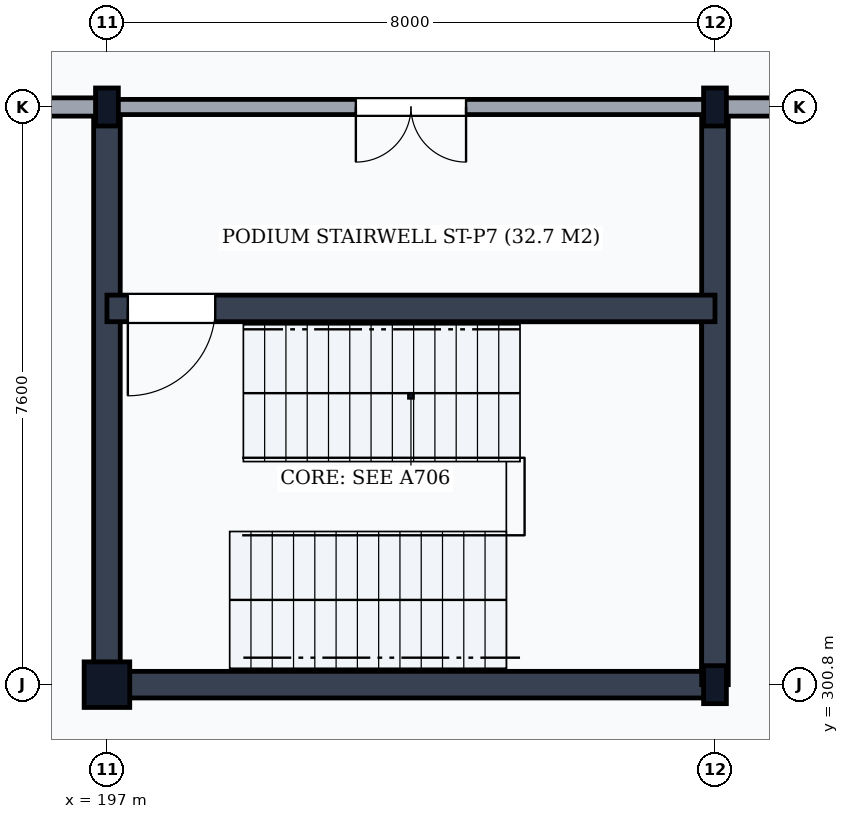
"""IFC4 building model, lengths in metres.
Left out: names, types, materials, properties, quantities, classifications, styles, units other than length and angle.
Written with IfcOpenShell. Run it as: python <this file> out.ifc"""

import sys

from ifc_helpers import new_model, si_unit, direction, frame, frame_2d, origin, origin_2d, place, context, subcontext, project, spatial, rectangle, i_section, extrude, element, fill, save


model = new_model("IFC4")
c1 = context("Model", 3, precision=1e-05, world=origin(), true_north=direction((0.0, 1.0)))
c2 = subcontext(c1, "Body", "Model", "MODEL_VIEW")
j1 = project(units=[si_unit("LENGTHUNIT", "METRE"), si_unit("PLANEANGLEUNIT", "RADIAN")], contexts=[c1])
p1 = place(None, origin())
s1 = spatial("IfcSite", under=j1, at=p1, CompositionType="ELEMENT")
p2 = place(p1, origin())
s2 = spatial("IfcBuilding", under=s1, at=p2, CompositionType="ELEMENT")
p3 = place(p2, frame((0.0, 0.0, -4.8)))
s3 = spatial("IfcBuildingStorey", under=s2, at=p3, CompositionType="ELEMENT", Elevation=-4.8)
p4 = place(p3, frame((197.0, 300.8, 0.0), z_axis=(0.0, 0.0, 1.0), x_axis=(1.0, 0.0, 0.0)))
e1 = element("IfcColumn", 1, at=p4, inside=s3, PredefinedType="COLUMN", context=c2, shape_type="SweptSolid", body=[
    extrude(rectangle(XDim=0.6, YDim=0.6, at=origin_2d()), origin(), (0.0, 0.0, 1.0), 4.8),
])
for number, where, z_axis, x_axis in (
    (2, (197.0, 308.4, 0.0), (0.0, 0.0, 1.0), (1.0, 0.0, 0.0)),
    (3, (205.0, 300.8, 0.0), (0.0, 0.0, 1.0), (1.0, 0.0, 0.0)),
    (4, (205.0, 308.4, 0.0), (0.0, 0.0, 1.0), (1.0, 0.0, 0.0)),
):
    element("IfcColumn", number, at=place(p3, frame(where, z_axis=z_axis, x_axis=x_axis)), inside=s3, PredefinedType="COLUMN", context=c2, shape_type="SweptSolid", body=[
        extrude(i_section(OverallWidth=0.3, OverallDepth=0.5, WebThickness=0.014, FlangeThickness=0.028, FilletRadius=0.027, at=origin_2d()), origin(), (0.0, 0.0, 1.0), 4.8),
    ])
p5 = place(p3, frame((197.0, 300.8, 0.0), z_axis=(0.0, 0.0, 1.0), x_axis=(1.0, 0.0, 0.0)))
e5 = element("IfcWall", 5, at=p5, inside=s3, PredefinedType="SHEAR", context=c2, shape_type="SweptSolid", body=[
    extrude(rectangle(XDim=8.0, YDim=0.35, at=frame_2d((4.0, 0.0))), origin(), (0.0, 0.0, 1.0), 4.51),
])
for number, where, z_axis, x_axis in (
    (6, (197.0, 300.8, 0.0), (0.0, 0.0, 1.0), (0.0, 1.0, 0.0)),
    (7, (205.0, 300.8, 0.0), (0.0, 0.0, 1.0), (0.0, 1.0, 0.0)),
):
    element("IfcWall", number, at=place(p3, frame(where, z_axis=z_axis, x_axis=x_axis)), inside=s3, PredefinedType="SHEAR", context=c2, shape_type="SweptSolid", body=[
        extrude(rectangle(XDim=7.6, YDim=0.35, at=frame_2d((3.8, 0.0))), origin(), (0.0, 0.0, 1.0), 4.51),
    ])
p6 = place(p3, frame((197.0, 305.75, 0.0), z_axis=(0.0, 0.0, 1.0), x_axis=(1.0, 0.0, 0.0)))
e8 = element("IfcWall", 8, at=p6, inside=s3, PredefinedType="SHEAR", context=c2, shape_type="SweptSolid", body=[
    extrude(rectangle(XDim=8.0, YDim=0.35, at=frame_2d((4.0, 0.0))), origin(), (0.0, 0.0, 1.0), 4.51),
])
p7 = place(p6, frame((0.275, 0.0, 0.0)))
e9 = element("IfcOpeningElement", 9, at=p7, cuts=e8, PredefinedType="OPENING", context=c2, shape_type="SweptSolid", body=[
    extrude(rectangle(XDim=1.15, YDim=2.15, at=frame_2d((0.575, 1.075))), frame((0.0, 0.19, 0.0), z_axis=(0.0, -1.0, 0.0), x_axis=(1.0, 0.0, 0.0)), (0.0, 0.0, 1.0), 0.38),
])
p8 = place(p3, frame((197.0, 308.4, 0.0), z_axis=(0.0, 0.0, 1.0), x_axis=(1.0, 0.0, 0.0)))
e10 = element("IfcWall", 10, at=p8, inside=s3, PredefinedType="PARTITIONING", context=c2, shape_type="SweptSolid", body=[
    extrude(rectangle(XDim=8.0, YDim=0.2, at=frame_2d((4.0, 0.0))), origin(), (0.0, 0.0, 1.0), 3.858),
])
p9 = place(p8, frame((3.275, 0.0, 0.0)))
e11 = element("IfcOpeningElement", 11, at=p9, cuts=e10, PredefinedType="OPENING", context=c2, shape_type="SweptSolid", body=[
    extrude(rectangle(XDim=1.45, YDim=2.2, at=frame_2d((0.725, 1.1))), frame((0.0, 0.115, 0.0), z_axis=(0.0, -1.0, 0.0), x_axis=(1.0, 0.0, 0.0)), (0.0, 0.0, 1.0), 0.23),
])
p10 = place(p3, frame((165.0, 308.4, 0.0), z_axis=(0.0, 0.0, 1.0), x_axis=(1.0, 0.0, 0.0)))
e12 = element("IfcWall", 12, at=p10, inside=s3, PredefinedType="PARTITIONING", context=c2, shape_type="SweptSolid", body=[
    extrude(rectangle(XDim=32.0, YDim=0.24, at=frame_2d((16.0, 0.0))), origin(), (0.0, 0.0, 1.0), 3.858),
])
p11 = place(p3, frame((205.0, 308.4, 0.0), z_axis=(0.0, 0.0, 1.0), x_axis=(1.0, 0.0, 0.0)))
e13 = element("IfcWall", 13, at=p11, inside=s3, PredefinedType="PARTITIONING", context=c2, shape_type="SweptSolid", body=[
    extrude(rectangle(XDim=41.0, YDim=0.24, at=frame_2d((20.5, 0.0))), origin(), (0.0, 0.0, 1.0), 3.808),
])
p12 = place(p7, frame((1.15, 0.0, 0.0), z_axis=(0.0, 0.0, 1.0), x_axis=(-1.0, 0.0, 0.0)))
e14 = element("IfcDoor", 14, at=p12, inside=s3, OperationType="SINGLE_SWING_RIGHT", PredefinedType="DOOR", context=c2, shape_type="SweptSolid", body=[
    extrude(rectangle(XDim=1.15, YDim=2.15, at=frame_2d((0.575, 1.075))), frame((0.0, 0.025, 0.0), z_axis=(0.0, -1.0, 0.0), x_axis=(1.0, 0.0, 0.0)), (0.0, 0.0, 1.0), 0.05),
])
fill(e9, e14)
p13 = place(p9, frame((1.45, 0.0, 0.0), z_axis=(0.0, 0.0, 1.0), x_axis=(-1.0, 0.0, 0.0)))
e15 = element("IfcDoor", 15, at=p13, inside=s3, OperationType="DOUBLE_DOOR_SINGLE_SWING", PredefinedType="DOOR", context=c2, shape_type="SweptSolid", body=[
    extrude(rectangle(XDim=1.45, YDim=2.2, at=frame_2d((0.725, 1.1))), frame((0.0, 0.025, 0.0), z_axis=(0.0, -1.0, 0.0), x_axis=(1.0, 0.0, 0.0)), (0.0, 0.0, 1.0), 0.05),
])
fill(e11, e15)
save(model, sys.argv[1])
